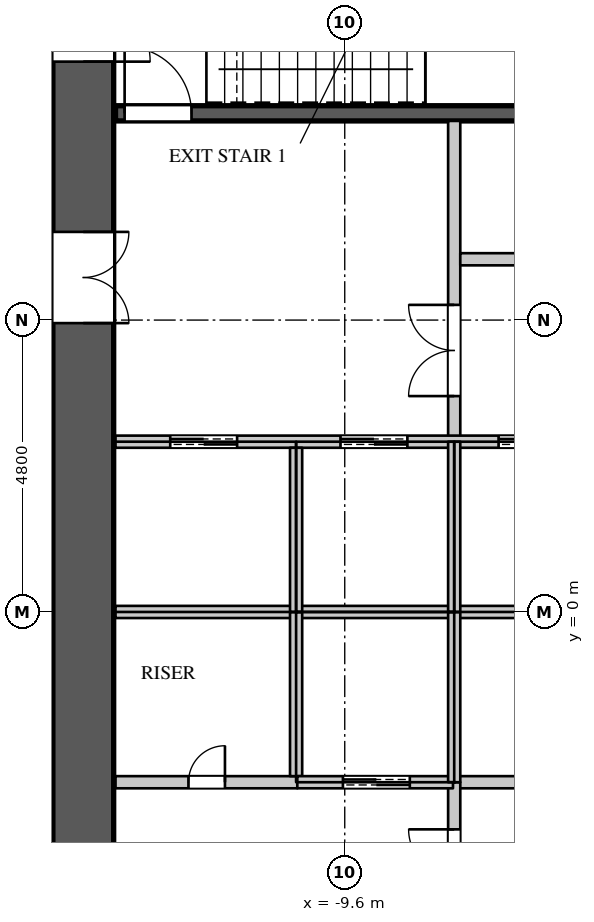
"""IFC4 building model, lengths in metres.
Left out: names, types, materials, properties, quantities, classifications, styles, units other than length and angle.
Written with IfcOpenShell. Run it as: python <this file> out.ifc"""

import sys

from ifc_helpers import new_model, si_unit, direction, frame, frame_2d, origin, place, context, subcontext, project, spatial, rectangle, extrude, element, fill, save


model = new_model("IFC4")
c1 = context("Model", 3, precision=1e-05, world=origin(), true_north=direction((0.0, 1.0)))
c2 = subcontext(c1, "Body", "Model", "MODEL_VIEW")
j1 = project(units=[si_unit("LENGTHUNIT", "METRE"), si_unit("PLANEANGLEUNIT", "RADIAN")], contexts=[c1])
p1 = place(None, origin())
s1 = spatial("IfcSite", under=j1, at=p1, CompositionType="ELEMENT")
p2 = place(p1, origin())
s2 = spatial("IfcBuilding", under=s1, at=p2, CompositionType="ELEMENT")
p3 = place(p2, frame((0.0, 0.0, 59.1)))
s3 = spatial("IfcBuildingStorey", under=s2, at=p3, CompositionType="ELEMENT", Elevation=59.1)
p4 = place(p3, frame((-13.9, -11.0, 0.0), z_axis=(0.0, 0.0, 1.0), x_axis=(0.0, 1.0, 0.0)))
e1 = element("IfcWall", 1, at=p4, inside=s3, PredefinedType="SHEAR", context=c2, shape_type="SweptSolid", body=[
    extrude(rectangle(XDim=22.0, YDim=1.0, at=frame_2d((11.0, 0.0))), origin(), (0.0, 0.0, 1.0), 4.2),
])
p5 = place(p4, frame((20.05, 0.0, 0.0)))
e2 = element("IfcOpeningElement", 2, at=p5, cuts=e1, PredefinedType="OPENING", context=c2, shape_type="SweptSolid", body=[
    extrude(rectangle(XDim=1.1, YDim=2.2, at=frame_2d((0.55, 1.1))), frame((0.0, 0.51, 0.0), z_axis=(0.0, -1.0, 0.0), x_axis=(1.0, 0.0, 0.0)), (0.0, 0.0, 1.0), 1.02),
])
p6 = place(p4, frame((0.85, 0.0, 0.0)))
e3 = element("IfcOpeningElement", 3, at=p6, cuts=e1, PredefinedType="OPENING", context=c2, shape_type="SweptSolid", body=[
    extrude(rectangle(XDim=1.1, YDim=2.2, at=frame_2d((0.55, 1.1))), frame((0.0, 0.51, 0.0), z_axis=(0.0, -1.0, 0.0), x_axis=(1.0, 0.0, 0.0)), (0.0, 0.0, 1.0), 1.02),
])
p7 = place(p4, frame((15.75, 0.0, 0.0)))
e4 = element("IfcOpeningElement", 4, at=p7, cuts=e1, PredefinedType="OPENING", context=c2, shape_type="SweptSolid", body=[
    extrude(rectangle(XDim=1.5, YDim=2.4, at=frame_2d((0.75, 1.2))), frame((0.0, 0.51, 0.0), z_axis=(0.0, -1.0, 0.0), x_axis=(1.0, 0.0, 0.0)), (0.0, 0.0, 1.0), 1.02),
])
p8 = place(p4, frame((4.75, 0.0, 0.0)))
e5 = element("IfcOpeningElement", 5, at=p8, cuts=e1, PredefinedType="OPENING", context=c2, shape_type="SweptSolid", body=[
    extrude(rectangle(XDim=1.5, YDim=2.4, at=frame_2d((0.75, 1.2))), frame((0.0, 0.51, 0.0), z_axis=(0.0, -1.0, 0.0), x_axis=(1.0, 0.0, 0.0)), (0.0, 0.0, 1.0), 1.02),
])
p9 = place(p3, frame((-7.82, -2.8, 0.0), z_axis=(0.0, 0.0, 1.0), x_axis=(1.0, 0.0, 0.0)))
e6 = element("IfcWall", 6, at=p9, inside=s3, PredefinedType="PARTITIONING", context=c2, shape_type="SweptSolid", body=[
    extrude(rectangle(XDim=15.64, YDim=0.2, at=frame_2d((7.82, 0.0))), origin(), (0.0, 0.0, 1.0), 3.95),
])
p10 = place(p9, frame((1.5, 0.0, 0.0)))
e7 = element("IfcOpeningElement", 7, at=p10, cuts=e6, PredefinedType="OPENING", context=c2, shape_type="SweptSolid", body=[
    extrude(rectangle(XDim=0.9, YDim=2.2, at=frame_2d((0.45, 1.1))), frame((0.0, 0.11, 0.0), z_axis=(0.0, -1.0, 0.0), x_axis=(1.0, 0.0, 0.0)), (0.0, 0.0, 1.0), 0.22),
])
p11 = place(p9, frame((4.95, 0.0, 0.0)))
e8 = element("IfcOpeningElement", 8, at=p11, cuts=e6, PredefinedType="OPENING", context=c2, shape_type="SweptSolid", body=[
    extrude(rectangle(XDim=0.9, YDim=2.2, at=frame_2d((0.45, 1.1))), frame((0.0, 0.11, 0.0), z_axis=(0.0, -1.0, 0.0), x_axis=(1.0, 0.0, 0.0)), (0.0, 0.0, 1.0), 0.22),
])
p12 = place(p9, frame((7.95, 0.0, 0.0)))
e9 = element("IfcOpeningElement", 9, at=p12, cuts=e6, PredefinedType="OPENING", context=c2, shape_type="SweptSolid", body=[
    extrude(rectangle(XDim=0.9, YDim=2.2, at=frame_2d((0.45, 1.1))), frame((0.0, 0.11, 0.0), z_axis=(0.0, -1.0, 0.0), x_axis=(1.0, 0.0, 0.0)), (0.0, 0.0, 1.0), 0.22),
])
p13 = place(p9, frame((12.2, 0.0, 0.0)))
e10 = element("IfcOpeningElement", 10, at=p13, cuts=e6, PredefinedType="OPENING", context=c2, shape_type="SweptSolid", body=[
    extrude(rectangle(XDim=0.9, YDim=2.2, at=frame_2d((0.45, 1.1))), frame((0.0, 0.11, 0.0), z_axis=(0.0, -1.0, 0.0), x_axis=(1.0, 0.0, 0.0)), (0.0, 0.0, 1.0), 0.22),
])
p14 = place(p3, frame((-7.8, -8.075, 0.0), z_axis=(0.0, 0.0, 1.0), x_axis=(0.0, 1.0, 0.0)))
e11 = element("IfcWall", 11, at=p14, inside=s3, PredefinedType="PARTITIONING", context=c2, shape_type="SweptSolid", body=[
    extrude(rectangle(XDim=5.275, YDim=0.2, at=frame_2d((2.637, 0.0))), origin(), (0.0, 0.0, 1.0), 3.95),
])
p15 = place(p14, frame((3.0, 0.0, 0.0)))
e12 = element("IfcOpeningElement", 12, at=p15, cuts=e11, PredefinedType="OPENING", context=c2, shape_type="SweptSolid", body=[
    extrude(rectangle(XDim=1.5, YDim=2.4, at=frame_2d((0.75, 1.2))), frame((0.0, 0.11, 0.0), z_axis=(0.0, -1.0, 0.0), x_axis=(1.0, 0.0, 0.0)), (0.0, 0.0, 1.0), 0.22),
])
p16 = place(p3, frame((-7.8, 2.8, 0.0), z_axis=(0.0, 0.0, 1.0), x_axis=(0.0, 1.0, 0.0)))
e13 = element("IfcWall", 13, at=p16, inside=s3, PredefinedType="PARTITIONING", context=c2, shape_type="SweptSolid", body=[
    extrude(rectangle(XDim=5.275, YDim=0.2, at=frame_2d((2.637, 0.0))), origin(), (0.0, 0.0, 1.0), 3.95),
])
p17 = place(p16, frame((0.75, 0.0, 0.0)))
e14 = element("IfcOpeningElement", 14, at=p17, cuts=e13, PredefinedType="OPENING", context=c2, shape_type="SweptSolid", body=[
    extrude(rectangle(XDim=1.5, YDim=2.4, at=frame_2d((0.75, 1.2))), frame((0.0, 0.11, 0.0), z_axis=(0.0, -1.0, 0.0), x_axis=(1.0, 0.0, 0.0)), (0.0, 0.0, 1.0), 0.22),
])
p18 = place(p3, frame((-7.7, 5.8, 0.0), z_axis=(0.0, 0.0, 1.0), x_axis=(1.0, 0.0, 0.0)))
e15 = element("IfcWall", 15, at=p18, inside=s3, PredefinedType="PARTITIONING", context=c2, shape_type="SweptSolid", body=[
    extrude(rectangle(XDim=8.12, YDim=0.2, at=frame_2d((4.06, 0.0))), origin(), (0.0, 0.0, 1.0), 3.95),
])
p19 = place(p18, frame((3.6, 0.0, 0.0)))
e16 = element("IfcOpeningElement", 16, at=p19, cuts=e15, PredefinedType="OPENING", context=c2, shape_type="SweptSolid", body=[
    extrude(rectangle(XDim=0.9, YDim=2.2, at=frame_2d((0.45, 1.1))), frame((0.0, 0.11, 0.0), z_axis=(0.0, -1.0, 0.0), x_axis=(1.0, 0.0, 0.0)), (0.0, 0.0, 1.0), 0.22),
])
p20 = place(p3, frame((-13.37, -2.8, 0.0), z_axis=(0.0, 0.0, 1.0), x_axis=(1.0, 0.0, 0.0)))
e17 = element("IfcWall", 17, at=p20, inside=s3, PredefinedType="PARTITIONING", context=c2, shape_type="SweptSolid", body=[
    extrude(rectangle(XDim=2.99, YDim=0.2, at=frame_2d((1.495, 0.0))), origin(), (0.0, 0.0, 1.0), 3.95),
])
p21 = place(p20, frame((1.2, 0.0, 0.0)))
e18 = element("IfcOpeningElement", 18, at=p21, cuts=e17, PredefinedType="OPENING", context=c2, shape_type="SweptSolid", body=[
    extrude(rectangle(XDim=0.6, YDim=2.0, at=frame_2d((0.3, 1.0))), frame((0.0, 0.11, 0.0), z_axis=(0.0, -1.0, 0.0), x_axis=(1.0, 0.0, 0.0)), (0.0, 0.0, 1.0), 0.22),
])
p22 = place(p3, frame((-13.37, 0.0, 0.0), z_axis=(0.0, 0.0, 1.0), x_axis=(1.0, 0.0, 0.0)))
e19 = element("IfcWall", 19, at=p22, inside=s3, PredefinedType="PARTITIONING", context=c2, shape_type="SweptSolid", body=[
    extrude(rectangle(XDim=23.77, YDim=0.2, at=frame_2d((11.885, 0.0))), origin(), (0.0, 0.0, 1.0), 3.95),
])
p23 = place(p3, frame((-13.37, 2.8, 0.0), z_axis=(0.0, 0.0, 1.0), x_axis=(1.0, 0.0, 0.0)))
e20 = element("IfcWall", 20, at=p23, inside=s3, PredefinedType="PARTITIONING", context=c2, shape_type="SweptSolid", body=[
    extrude(rectangle(XDim=23.77, YDim=0.2, at=frame_2d((11.885, 0.0))), origin(), (0.0, 0.0, 1.0), 3.95),
])
p24 = place(p23, frame((0.9, 0.0, 0.0)))
e21 = element("IfcOpeningElement", 21, at=p24, cuts=e20, PredefinedType="OPENING", context=c2, shape_type="SweptSolid", body=[
    extrude(rectangle(XDim=1.1, YDim=2.2, at=frame_2d((0.55, 1.1))), frame((0.0, 0.11, 0.0), z_axis=(0.0, -1.0, 0.0), x_axis=(1.0, 0.0, 0.0)), (0.0, 0.0, 1.0), 0.22),
])
p25 = place(p23, frame((3.7, 0.0, 0.0)))
e22 = element("IfcOpeningElement", 22, at=p25, cuts=e20, PredefinedType="OPENING", context=c2, shape_type="SweptSolid", body=[
    extrude(rectangle(XDim=1.1, YDim=2.2, at=frame_2d((0.55, 1.1))), frame((0.0, 0.11, 0.0), z_axis=(0.0, -1.0, 0.0), x_axis=(1.0, 0.0, 0.0)), (0.0, 0.0, 1.0), 0.22),
])
p26 = place(p23, frame((6.3, 0.0, 0.0)))
e23 = element("IfcOpeningElement", 23, at=p26, cuts=e20, PredefinedType="OPENING", context=c2, shape_type="SweptSolid", body=[
    extrude(rectangle(XDim=1.1, YDim=2.2, at=frame_2d((0.55, 1.1))), frame((0.0, 0.11, 0.0), z_axis=(0.0, -1.0, 0.0), x_axis=(1.0, 0.0, 0.0)), (0.0, 0.0, 1.0), 0.22),
])
p27 = place(p23, frame((8.9, 0.0, 0.0)))
e24 = element("IfcOpeningElement", 24, at=p27, cuts=e20, PredefinedType="OPENING", context=c2, shape_type="SweptSolid", body=[
    extrude(rectangle(XDim=1.1, YDim=2.2, at=frame_2d((0.55, 1.1))), frame((0.0, 0.11, 0.0), z_axis=(0.0, -1.0, 0.0), x_axis=(1.0, 0.0, 0.0)), (0.0, 0.0, 1.0), 0.22),
])
p28 = place(p23, frame((11.5, 0.0, 0.0)))
e25 = element("IfcOpeningElement", 25, at=p28, cuts=e20, PredefinedType="OPENING", context=c2, shape_type="SweptSolid", body=[
    extrude(rectangle(XDim=1.1, YDim=2.2, at=frame_2d((0.55, 1.1))), frame((0.0, 0.11, 0.0), z_axis=(0.0, -1.0, 0.0), x_axis=(1.0, 0.0, 0.0)), (0.0, 0.0, 1.0), 0.22),
])
p29 = place(p23, frame((14.1, 0.0, 0.0)))
e26 = element("IfcOpeningElement", 26, at=p29, cuts=e20, PredefinedType="OPENING", context=c2, shape_type="SweptSolid", body=[
    extrude(rectangle(XDim=1.1, YDim=2.2, at=frame_2d((0.55, 1.1))), frame((0.0, 0.11, 0.0), z_axis=(0.0, -1.0, 0.0), x_axis=(1.0, 0.0, 0.0)), (0.0, 0.0, 1.0), 0.22),
])
p30 = place(p23, frame((16.7, 0.0, 0.0)))
e27 = element("IfcOpeningElement", 27, at=p30, cuts=e20, PredefinedType="OPENING", context=c2, shape_type="SweptSolid", body=[
    extrude(rectangle(XDim=1.1, YDim=2.2, at=frame_2d((0.55, 1.1))), frame((0.0, 0.11, 0.0), z_axis=(0.0, -1.0, 0.0), x_axis=(1.0, 0.0, 0.0)), (0.0, 0.0, 1.0), 0.22),
])
p31 = place(p23, frame((19.3, 0.0, 0.0)))
e28 = element("IfcOpeningElement", 28, at=p31, cuts=e20, PredefinedType="OPENING", context=c2, shape_type="SweptSolid", body=[
    extrude(rectangle(XDim=1.1, YDim=2.2, at=frame_2d((0.55, 1.1))), frame((0.0, 0.11, 0.0), z_axis=(0.0, -1.0, 0.0), x_axis=(1.0, 0.0, 0.0)), (0.0, 0.0, 1.0), 0.22),
])
p32 = place(p3, frame((-10.4, -2.7, 0.0), z_axis=(0.0, 0.0, 1.0), x_axis=(0.0, 1.0, 0.0)))
e29 = element("IfcWall", 29, at=p32, inside=s3, PredefinedType="PARTITIONING", context=c2, shape_type="SweptSolid", body=[
    extrude(rectangle(XDim=2.7, YDim=0.2, at=frame_2d((1.35, 0.0))), origin(), (0.0, 0.0, 1.0), 3.95),
])
p33 = place(p3, frame((-10.38, -2.8, 0.0), z_axis=(0.0, 0.0, 1.0), x_axis=(1.0, 0.0, 0.0)))
e30 = element("IfcWall", 30, at=p33, inside=s3, PredefinedType="PARTITIONING", context=c2, shape_type="SweptSolid", body=[
    extrude(rectangle(XDim=2.56, YDim=0.2, at=frame_2d((1.28, 0.0))), origin(), (0.0, 0.0, 1.0), 3.95),
])
p34 = place(p33, frame((0.75, 0.0, 0.0)))
e31 = element("IfcOpeningElement", 31, at=p34, cuts=e30, PredefinedType="OPENING", context=c2, shape_type="SweptSolid", body=[
    extrude(rectangle(XDim=1.1, YDim=2.2, at=frame_2d((0.55, 1.1))), frame((0.0, 0.11, 0.0), z_axis=(0.0, -1.0, 0.0), x_axis=(1.0, 0.0, 0.0)), (0.0, 0.0, 1.0), 0.22),
])
p35 = place(p3, frame((-10.4, 0.0, 0.0), z_axis=(0.0, 0.0, 1.0), x_axis=(0.0, 1.0, 0.0)))
e32 = element("IfcWall", 32, at=p35, inside=s3, PredefinedType="PARTITIONING", context=c2, shape_type="SweptSolid", body=[
    extrude(rectangle(XDim=2.7, YDim=0.2, at=frame_2d((1.35, 0.0))), origin(), (0.0, 0.0, 1.0), 3.95),
])
for number, where, z_axis, x_axis in (
    (33, (-7.8, -2.8, 0.0), (0.0, 0.0, 1.0), (0.0, 1.0, 0.0)),
    (34, (-7.8, 0.0, 0.0), (0.0, 0.0, 1.0), (0.0, 1.0, 0.0)),
):
    element("IfcWall", number, at=place(p3, frame(where, z_axis=z_axis, x_axis=x_axis)), inside=s3, PredefinedType="PARTITIONING", context=c2, shape_type="SweptSolid", body=[
        extrude(rectangle(XDim=2.8, YDim=0.2, at=frame_2d((1.4, 0.0))), origin(), (0.0, 0.0, 1.0), 3.95),
    ])
p36 = place(p3, frame((-13.37, 8.2, 0.0), z_axis=(0.0, 0.0, 1.0), x_axis=(1.0, 0.0, 0.0)))
e35 = element("IfcWall", 35, at=p36, inside=s3, PredefinedType="SHEAR", context=c2, shape_type="SweptSolid", body=[
    extrude(rectangle(XDim=8.095, YDim=0.25, at=frame_2d((4.048, 0.0))), origin(), (0.0, 0.0, 1.0), 3.95),
])
p37 = place(p36, frame((0.15, 0.0, 0.0)))
e36 = element("IfcOpeningElement", 36, at=p37, cuts=e35, PredefinedType="OPENING", context=c2, shape_type="SweptSolid", body=[
    extrude(rectangle(XDim=1.1, YDim=2.2, at=frame_2d((0.55, 1.1))), frame((0.0, 0.135, 0.0), z_axis=(0.0, -1.0, 0.0), x_axis=(1.0, 0.0, 0.0)), (0.0, 0.0, 1.0), 0.27),
])
p38 = place(p21, origin())
e37 = element("IfcDoor", 37, at=p38, inside=s3, OperationType="SINGLE_SWING_RIGHT", PredefinedType="DOOR", context=c2, shape_type="SweptSolid", body=[
    extrude(rectangle(XDim=0.6, YDim=2.0, at=frame_2d((0.3, 1.0))), frame((0.0, 0.025, 0.0), z_axis=(0.0, -1.0, 0.0), x_axis=(1.0, 0.0, 0.0)), (0.0, 0.0, 1.0), 0.05),
])
fill(e18, e37)
p39 = place(p24, origin())
e38 = element("IfcDoor", 38, at=p39, inside=s3, OperationType="DOUBLE_DOOR_SLIDING", PredefinedType="DOOR", context=c2, shape_type="SweptSolid", body=[
    extrude(rectangle(XDim=1.1, YDim=2.2, at=frame_2d((0.55, 1.1))), frame((0.0, 0.025, 0.0), z_axis=(0.0, -1.0, 0.0), x_axis=(1.0, 0.0, 0.0)), (0.0, 0.0, 1.0), 0.05),
])
fill(e21, e38)
p40 = place(p25, origin())
e39 = element("IfcDoor", 39, at=p40, inside=s3, OperationType="DOUBLE_DOOR_SLIDING", PredefinedType="DOOR", context=c2, shape_type="SweptSolid", body=[
    extrude(rectangle(XDim=1.1, YDim=2.2, at=frame_2d((0.55, 1.1))), frame((0.0, 0.025, 0.0), z_axis=(0.0, -1.0, 0.0), x_axis=(1.0, 0.0, 0.0)), (0.0, 0.0, 1.0), 0.05),
])
fill(e22, e39)
p41 = place(p34, origin())
e40 = element("IfcDoor", 40, at=p41, inside=s3, OperationType="DOUBLE_DOOR_SLIDING", PredefinedType="DOOR", context=c2, shape_type="SweptSolid", body=[
    extrude(rectangle(XDim=1.1, YDim=2.2, at=frame_2d((0.55, 1.1))), frame((0.0, 0.025, 0.0), z_axis=(0.0, -1.0, 0.0), x_axis=(1.0, 0.0, 0.0)), (0.0, 0.0, 1.0), 0.05),
])
fill(e31, e40)
p42 = place(p26, origin())
e41 = element("IfcDoor", 41, at=p42, inside=s3, OperationType="DOUBLE_DOOR_SLIDING", PredefinedType="DOOR", context=c2, shape_type="SweptSolid", body=[
    extrude(rectangle(XDim=1.1, YDim=2.2, at=frame_2d((0.55, 1.1))), frame((0.0, 0.025, 0.0), z_axis=(0.0, -1.0, 0.0), x_axis=(1.0, 0.0, 0.0)), (0.0, 0.0, 1.0), 0.05),
])
fill(e23, e41)
p43 = place(p37, origin())
e42 = element("IfcDoor", 42, at=p43, inside=s3, OperationType="SINGLE_SWING_LEFT", PredefinedType="DOOR", context=c2, shape_type="SweptSolid", body=[
    extrude(rectangle(XDim=1.1, YDim=2.2, at=frame_2d((0.55, 1.1))), frame((0.0, 0.025, 0.0), z_axis=(0.0, -1.0, 0.0), x_axis=(1.0, 0.0, 0.0)), (0.0, 0.0, 1.0), 0.05),
])
fill(e36, e42)
p44 = place(p17, origin())
e43 = element("IfcDoor", 43, at=p44, inside=s3, OperationType="DOUBLE_DOOR_SINGLE_SWING", PredefinedType="DOOR", context=c2, shape_type="SweptSolid", body=[
    extrude(rectangle(XDim=1.5, YDim=2.4, at=frame_2d((0.75, 1.2))), frame((0.0, 0.025, 0.0), z_axis=(0.0, -1.0, 0.0), x_axis=(1.0, 0.0, 0.0)), (0.0, 0.0, 1.0), 0.05),
])
fill(e14, e43)
p45 = place(p15, origin())
e44 = element("IfcDoor", 44, at=p45, inside=s3, OperationType="DOUBLE_DOOR_SINGLE_SWING", PredefinedType="DOOR", context=c2, shape_type="SweptSolid", body=[
    extrude(rectangle(XDim=1.5, YDim=2.4, at=frame_2d((0.75, 1.2))), frame((0.0, 0.025, 0.0), z_axis=(0.0, -1.0, 0.0), x_axis=(1.0, 0.0, 0.0)), (0.0, 0.0, 1.0), 0.05),
])
fill(e12, e44)
p46 = place(p5, origin())
e45 = element("IfcDoor", 45, at=p46, inside=s3, OperationType="SINGLE_SWING_RIGHT", PredefinedType="DOOR", context=c2, shape_type="SweptSolid", body=[
    extrude(rectangle(XDim=1.1, YDim=2.2, at=frame_2d((0.55, 1.1))), frame((0.0, -0.445, 0.0), z_axis=(0.0, -1.0, 0.0), x_axis=(1.0, 0.0, 0.0)), (0.0, 0.0, 1.0), 0.05),
])
fill(e2, e45)
p47 = place(p7, origin())
e46 = element("IfcDoor", 46, at=p47, inside=s3, OperationType="DOUBLE_DOOR_SINGLE_SWING", PredefinedType="DOOR", context=c2, shape_type="SweptSolid", body=[
    extrude(rectangle(XDim=1.5, YDim=2.4, at=frame_2d((0.75, 1.2))), frame((0.0, -0.445, 0.0), z_axis=(0.0, -1.0, 0.0), x_axis=(1.0, 0.0, 0.0)), (0.0, 0.0, 1.0), 0.05),
])
fill(e4, e46)
save(model, sys.argv[1])
